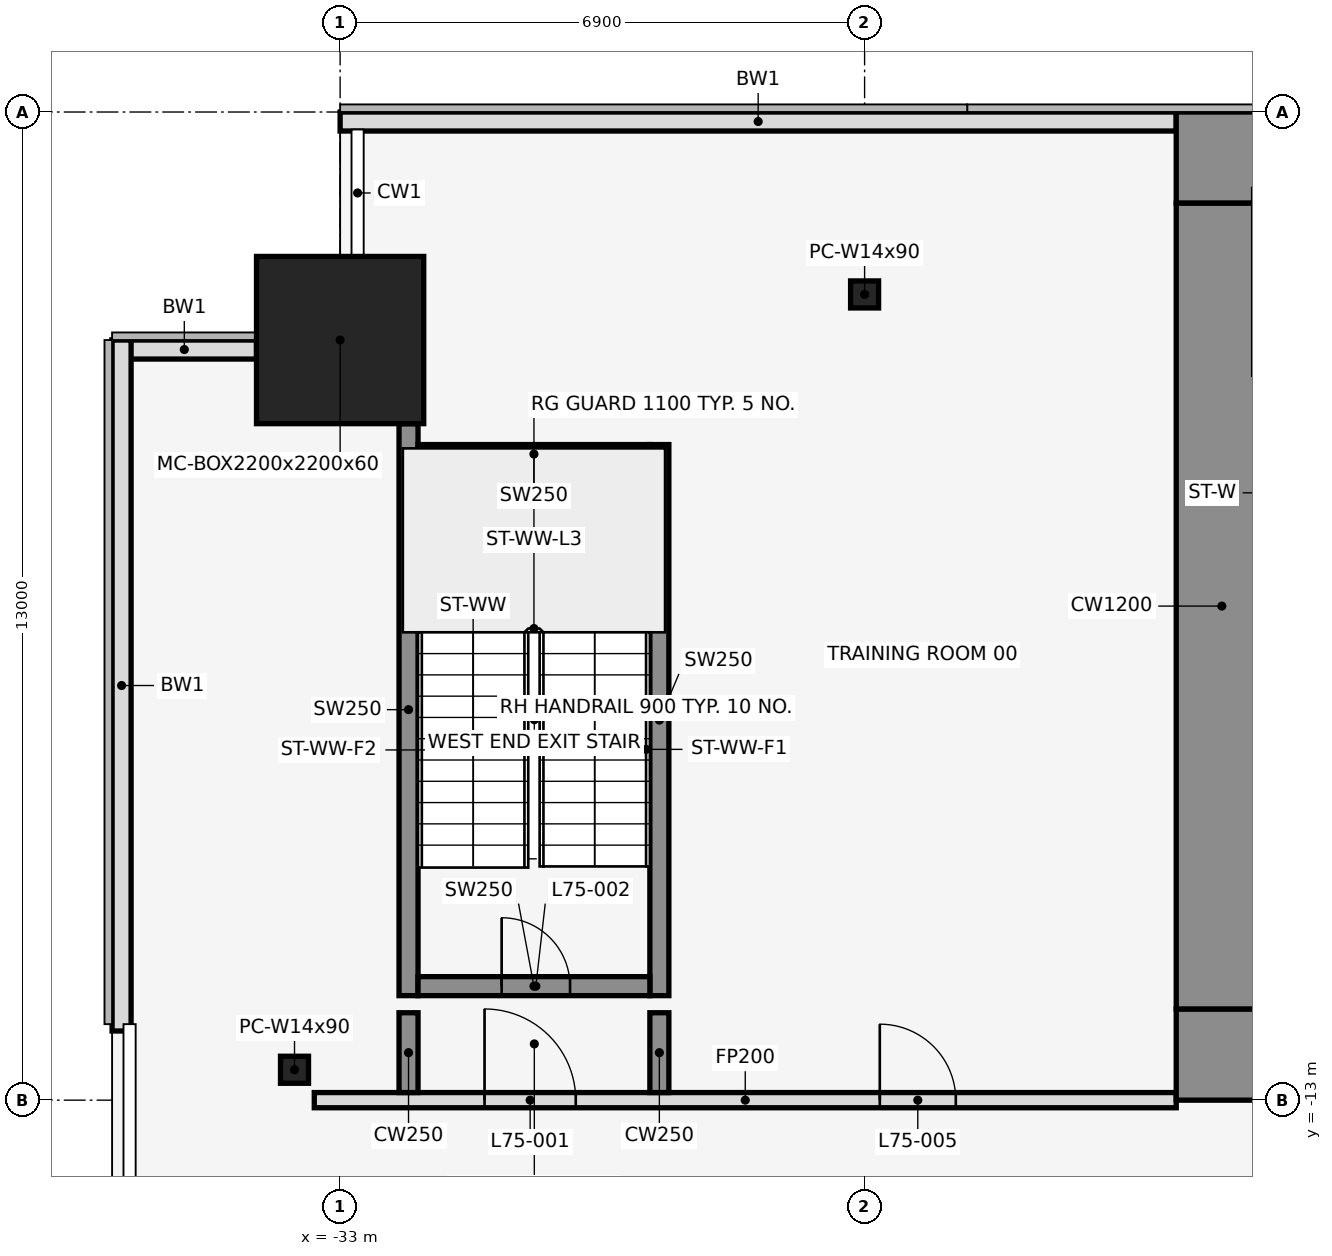
"""IFC4 building model, lengths in metres.
Left out: names, types, materials, properties, quantities, classifications, styles, units other than length and angle.
Written with IfcOpenShell. Run it as: python <this file> out.ifc"""

import sys

from ifc_helpers import new_model, si_unit, direction, frame, frame_2d, origin, origin_2d, place, context, subcontext, project, spatial, rectangle, hollow_rectangle, i_section, extrude, element, fill, save


model = new_model("IFC4")
c1 = context("Model", 3, precision=1e-05, world=origin(), true_north=direction((0.0, 1.0)))
c2 = subcontext(c1, "Body", "Model", "MODEL_VIEW")
j1 = project(units=[si_unit("LENGTHUNIT", "METRE"), si_unit("PLANEANGLEUNIT", "RADIAN")], contexts=[c1])
p1 = place(None, origin())
s1 = spatial("IfcSite", under=j1, at=p1, CompositionType="ELEMENT")
p2 = place(p1, origin())
s2 = spatial("IfcBuilding", under=s1, at=p2, CompositionType="ELEMENT")
p3 = place(p2, frame((0.0, 0.0, 333.5)))
s3 = spatial("IfcBuildingStorey", under=s2, at=p3, CompositionType="ELEMENT", Elevation=333.5)
p4 = place(p3, frame((-33.0, -3.0, 0.0), z_axis=(0.0, 0.0, 1.0), x_axis=(1.0, 0.0, 0.0)))
e1 = element("IfcColumn", 1, at=p4, inside=s3, PredefinedType="COLUMN", context=c2, shape_type="SweptSolid", body=[
    extrude(hollow_rectangle(XDim=2.2, YDim=2.2, WallThickness=0.06, at=origin_2d()), origin(), (0.0, 0.0, 1.0), 4.5),
])
for number, where, z_axis, x_axis in (
    (2, (-26.1, -2.4, 0.0), (0.0, 0.0, 1.0), (1.0, 0.0, 0.0)),
    (3, (-33.6, -12.6, 0.0), (0.0, 0.0, 1.0), (1.0, 0.0, 0.0)),
):
    element("IfcColumn", number, at=place(p3, frame(where, z_axis=z_axis, x_axis=x_axis)), inside=s3, PredefinedType="COLUMN", context=c2, shape_type="SweptSolid", body=[
        extrude(i_section(OverallWidth=0.368, OverallDepth=0.356, WebThickness=0.011, FlangeThickness=0.018, at=origin_2d()), origin(), (0.0, 0.0, 1.0), 4.5),
    ])
p5 = place(p3, frame((-22.0, -0.125, 0.0), z_axis=(0.0, 0.0, 1.0), x_axis=(-1.0, 0.0, 0.0)))
e4 = element("IfcWall", 4, at=p5, inside=s3, PredefinedType="STANDARD", context=c2, shape_type="SweptSolid", body=[
    extrude(rectangle(XDim=11.0, YDim=0.25, at=frame_2d((5.5, 0.0))), origin(), (0.0, 0.0, 1.0), 4.35),
])
p6 = place(p3, frame((-34.1, -3.125, 0.0), z_axis=(0.0, 0.0, 1.0), x_axis=(-1.0, 0.0, 0.0)))
e5 = element("IfcWall", 5, at=p6, inside=s3, PredefinedType="STANDARD", context=c2, shape_type="SweptSolid", body=[
    extrude(rectangle(XDim=1.9, YDim=0.25, at=frame_2d((0.95, 0.0))), origin(), (0.0, 0.0, 1.0), 4.35),
])
p7 = place(p3, frame((-35.875, -3.0, 0.0), z_axis=(0.0, 0.0, 1.0), x_axis=(0.0, -1.0, 0.0)))
e6 = element("IfcWall", 6, at=p7, inside=s3, PredefinedType="STANDARD", context=c2, shape_type="SweptSolid", body=[
    extrude(rectangle(XDim=9.09, YDim=0.25, at=frame_2d((4.545, 0.0))), origin(), (0.0, 0.0, 1.0), 4.35),
])
p8 = place(p3, frame((-32.1, -11.625, 0.0), z_axis=(0.0, 0.0, 1.0), x_axis=(0.0, 1.0, 0.0)))
e7 = element("IfcWall", 7, at=p8, inside=s3, PredefinedType="SHEAR", context=c2, shape_type="SweptSolid", body=[
    extrude(rectangle(XDim=7.525, YDim=0.25, at=frame_2d((3.762, 0.0))), origin(), (0.0, 0.0, 1.0), 4.5),
])
p9 = place(p3, frame((-28.8, -11.625, 0.0), z_axis=(0.0, 0.0, 1.0), x_axis=(0.0, 1.0, 0.0)))
e8 = element("IfcWall", 8, at=p9, inside=s3, PredefinedType="SHEAR", context=c2, shape_type="SweptSolid", body=[
    extrude(rectangle(XDim=7.25, YDim=0.25, at=frame_2d((3.625, 0.0))), origin(), (0.0, 0.0, 1.0), 4.5),
])
p10 = place(p3, frame((-31.975, -11.5, 0.0), z_axis=(0.0, 0.0, 1.0), x_axis=(1.0, 0.0, 0.0)))
e9 = element("IfcWall", 9, at=p10, inside=s3, PredefinedType="SHEAR", context=c2, shape_type="SweptSolid", body=[
    extrude(rectangle(XDim=3.05, YDim=0.25, at=frame_2d((1.525, 0.0))), origin(), (0.0, 0.0, 1.0), 4.5),
])
p11 = place(p10, frame((1.1, 0.0, 0.0)))
e10 = element("IfcOpeningElement", 10, at=p11, cuts=e9, PredefinedType="OPENING", context=c2, shape_type="SweptSolid", body=[
    extrude(rectangle(XDim=0.9, YDim=2.1, at=frame_2d((0.45, 1.05))), frame((0.0, 0.137, 0.0), z_axis=(0.0, -1.0, 0.0), x_axis=(1.0, 0.0, 0.0)), (0.0, 0.0, 1.0), 0.274),
])
p12 = place(p3, frame((-31.975, -4.5, 0.0), z_axis=(0.0, 0.0, 1.0), x_axis=(1.0, 0.0, 0.0)))
e11 = element("IfcWall", 11, at=p12, inside=s3, PredefinedType="SHEAR", context=c2, shape_type="SweptSolid", body=[
    extrude(rectangle(XDim=3.05, YDim=0.25, at=frame_2d((1.525, 0.0))), origin(), (0.0, 0.0, 1.0), 4.5),
])
p13 = place(p3, frame((-33.34, -13.0, 0.0), z_axis=(0.0, 0.0, 1.0), x_axis=(1.0, 0.0, 0.0)))
e12 = element("IfcWall", 12, at=p13, inside=s3, PredefinedType="PARTITIONING", context=c2, shape_type="SweptSolid", body=[
    extrude(rectangle(XDim=11.34, YDim=0.2, at=frame_2d((5.67, 0.0))), origin(), (0.0, 0.0, 1.0), 3.339),
])
p14 = place(p13, frame((2.24, 0.0, 0.0)))
e13 = element("IfcOpeningElement", 13, at=p14, cuts=e12, PredefinedType="OPENING", context=c2, shape_type="SweptSolid", body=[
    extrude(rectangle(XDim=1.2, YDim=2.1, at=frame_2d((0.6, 1.05))), frame((0.0, 0.112, 0.0), z_axis=(0.0, -1.0, 0.0), x_axis=(1.0, 0.0, 0.0)), (0.0, 0.0, 1.0), 0.224),
])
p15 = place(p13, frame((7.44, 0.0, 0.0)))
e14 = element("IfcOpeningElement", 14, at=p15, cuts=e12, PredefinedType="OPENING", context=c2, shape_type="SweptSolid", body=[
    extrude(rectangle(XDim=1.0, YDim=2.1, at=frame_2d((0.5, 1.05))), frame((0.0, 0.112, 0.0), z_axis=(0.0, -1.0, 0.0), x_axis=(1.0, 0.0, 0.0)), (0.0, 0.0, 1.0), 0.224),
])
for number, where, z_axis, x_axis in (
    (15, (-32.1, -12.9, 0.0), (0.0, 0.0, 1.0), (0.0, 1.0, 0.0)),
    (16, (-28.8, -12.9, 0.0), (0.0, 0.0, 1.0), (0.0, 1.0, 0.0)),
):
    element("IfcWall", number, at=place(p3, frame(where, z_axis=z_axis, x_axis=x_axis)), inside=s3, PredefinedType="SHEAR", context=c2, shape_type="SweptSolid", body=[
        extrude(rectangle(XDim=1.05, YDim=0.25, at=frame_2d((0.525, 0.0))), origin(), (0.0, 0.0, 1.0), 4.5),
    ])
p16 = place(p3, frame((-22.0, -0.6, 0.0), z_axis=(0.0, 0.0, 1.0), x_axis=(1.0, 0.0, 0.0)))
e17 = element("IfcWall", 17, at=p16, inside=s3, PredefinedType="SHEAR", context=c2, shape_type="SweptSolid", body=[
    extrude(rectangle(XDim=44.0, YDim=1.2, at=frame_2d((22.0, 0.0))), origin(), (0.0, 0.0, 1.0), 4.5),
])
p17 = place(p16, frame((18.55, 0.0, 0.0)))
e18 = element("IfcOpeningElement", 18, at=p17, cuts=e17, PredefinedType="OPENING", context=c2, shape_type="SweptSolid", body=[
    extrude(rectangle(XDim=0.9, YDim=2.1, at=frame_2d((0.45, 1.05))), frame((0.0, 0.612, 0.0), z_axis=(0.0, -1.0, 0.0), x_axis=(1.0, 0.0, 0.0)), (0.0, 0.0, 1.0), 1.224),
])
p18 = place(p16, frame((24.55, 0.0, 0.0)))
e19 = element("IfcOpeningElement", 19, at=p18, cuts=e17, PredefinedType="OPENING", context=c2, shape_type="SweptSolid", body=[
    extrude(rectangle(XDim=0.9, YDim=2.1, at=frame_2d((0.45, 1.05))), frame((0.0, 0.612, 0.0), z_axis=(0.0, -1.0, 0.0), x_axis=(1.0, 0.0, 0.0)), (0.0, 0.0, 1.0), 1.224),
])
p19 = place(p3, frame((-22.0, -12.4, 0.0), z_axis=(0.0, 0.0, 1.0), x_axis=(1.0, 0.0, 0.0)))
e20 = element("IfcWall", 20, at=p19, inside=s3, PredefinedType="SHEAR", context=c2, shape_type="SweptSolid", body=[
    extrude(rectangle(XDim=44.0, YDim=1.2, at=frame_2d((22.0, 0.0))), origin(), (0.0, 0.0, 1.0), 4.5),
])
p20 = place(p19, frame((2.2, 0.0, 0.0)))
e21 = element("IfcOpeningElement", 21, at=p20, cuts=e20, PredefinedType="OPENING", context=c2, shape_type="SweptSolid", body=[
    extrude(rectangle(XDim=1.2, YDim=2.1, at=frame_2d((0.6, 1.05))), frame((0.0, 0.612, 0.0), z_axis=(0.0, -1.0, 0.0), x_axis=(1.0, 0.0, 0.0)), (0.0, 0.0, 1.0), 1.224),
])
p21 = place(p19, frame((21.4, 0.0, 0.0)))
e22 = element("IfcOpeningElement", 22, at=p21, cuts=e20, PredefinedType="OPENING", context=c2, shape_type="SweptSolid", body=[
    extrude(rectangle(XDim=1.2, YDim=2.1, at=frame_2d((0.6, 1.05))), frame((0.0, 0.612, 0.0), z_axis=(0.0, -1.0, 0.0), x_axis=(1.0, 0.0, 0.0)), (0.0, 0.0, 1.0), 1.224),
])
p22 = place(p19, frame((40.6, 0.0, 0.0)))
e23 = element("IfcOpeningElement", 23, at=p22, cuts=e20, PredefinedType="OPENING", context=c2, shape_type="SweptSolid", body=[
    extrude(rectangle(XDim=1.2, YDim=2.1, at=frame_2d((0.6, 1.05))), frame((0.0, 0.612, 0.0), z_axis=(0.0, -1.0, 0.0), x_axis=(1.0, 0.0, 0.0)), (0.0, 0.0, 1.0), 1.224),
])
p23 = place(p19, frame((16.0, 0.0, 0.0)))
e24 = element("IfcOpeningElement", 24, at=p23, cuts=e20, PredefinedType="OPENING", context=c2, shape_type="SweptSolid", body=[
    extrude(rectangle(XDim=1.8, YDim=2.1, at=frame_2d((0.9, 1.05))), frame((0.0, 0.612, 0.0), z_axis=(0.0, -1.0, 0.0), x_axis=(1.0, 0.0, 0.0)), (0.0, 0.0, 1.0), 1.224),
])
p24 = place(p19, frame((6.3, 0.0, 0.0)))
e25 = element("IfcOpeningElement", 25, at=p24, cuts=e20, PredefinedType="OPENING", context=c2, shape_type="SweptSolid", body=[
    extrude(rectangle(XDim=1.2, YDim=2.1, at=frame_2d((0.6, 1.05))), frame((0.0, 0.612, 0.0), z_axis=(0.0, -1.0, 0.0), x_axis=(1.0, 0.0, 0.0)), (0.0, 0.0, 1.0), 1.224),
])
p25 = place(p19, frame((26.2, 0.0, 0.0)))
e26 = element("IfcOpeningElement", 26, at=p25, cuts=e20, PredefinedType="OPENING", context=c2, shape_type="SweptSolid", body=[
    extrude(rectangle(XDim=1.8, YDim=2.1, at=frame_2d((0.9, 1.05))), frame((0.0, 0.612, 0.0), z_axis=(0.0, -1.0, 0.0), x_axis=(1.0, 0.0, 0.0)), (0.0, 0.0, 1.0), 1.224),
])
p26 = place(p19, frame((36.5, 0.0, 0.0)))
e27 = element("IfcOpeningElement", 27, at=p26, cuts=e20, PredefinedType="OPENING", context=c2, shape_type="SweptSolid", body=[
    extrude(rectangle(XDim=1.2, YDim=2.1, at=frame_2d((0.6, 1.05))), frame((0.0, 0.612, 0.0), z_axis=(0.0, -1.0, 0.0), x_axis=(1.0, 0.0, 0.0)), (0.0, 0.0, 1.0), 1.224),
])
p27 = place(p3, frame((-21.4, -11.8, 0.0), z_axis=(0.0, 0.0, 1.0), x_axis=(0.0, 1.0, 0.0)))
e28 = element("IfcWall", 28, at=p27, inside=s3, PredefinedType="SHEAR", context=c2, shape_type="SweptSolid", body=[
    extrude(rectangle(XDim=10.6, YDim=1.2, at=frame_2d((5.3, 0.0))), origin(), (0.0, 0.0, 1.0), 4.5),
])
p28 = place(p14, origin())
e29 = element("IfcDoor", 29, at=p28, inside=s3, OperationType="SINGLE_SWING_LEFT", PredefinedType="DOOR", context=c2, shape_type="SweptSolid", body=[
    extrude(rectangle(XDim=1.2, YDim=2.1, at=frame_2d((0.6, 1.05))), frame((0.0, 0.025, 0.0), z_axis=(0.0, -1.0, 0.0), x_axis=(1.0, 0.0, 0.0)), (0.0, 0.0, 1.0), 0.05),
])
fill(e13, e29)
p29 = place(p11, origin())
e30 = element("IfcDoor", 30, at=p29, inside=s3, OperationType="SINGLE_SWING_LEFT", PredefinedType="DOOR", context=c2, shape_type="SweptSolid", body=[
    extrude(rectangle(XDim=0.9, YDim=2.1, at=frame_2d((0.45, 1.05))), frame((0.0, 0.025, 0.0), z_axis=(0.0, -1.0, 0.0), x_axis=(1.0, 0.0, 0.0)), (0.0, 0.0, 1.0), 0.05),
])
fill(e10, e30)
p30 = place(p15, origin())
e31 = element("IfcDoor", 31, at=p30, inside=s3, OperationType="SINGLE_SWING_LEFT", PredefinedType="DOOR", context=c2, shape_type="SweptSolid", body=[
    extrude(rectangle(XDim=1.0, YDim=2.1, at=frame_2d((0.5, 1.05))), frame((0.0, 0.025, 0.0), z_axis=(0.0, -1.0, 0.0), x_axis=(1.0, 0.0, 0.0)), (0.0, 0.0, 1.0), 0.05),
])
fill(e14, e31)
save(model, sys.argv[1])
